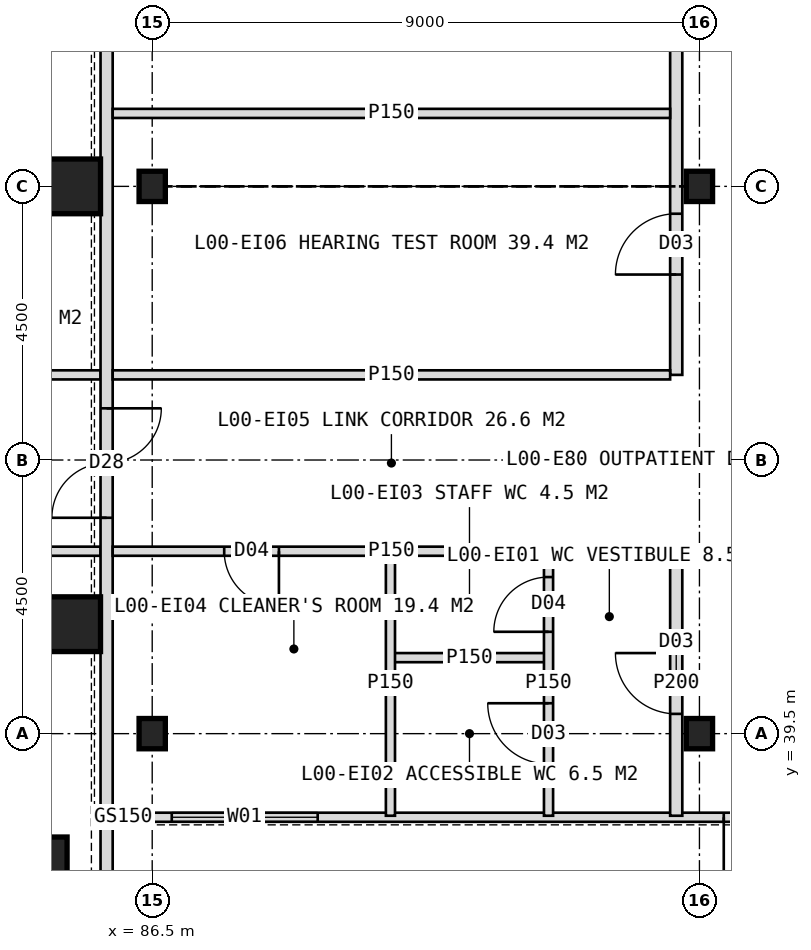
"""IFC4 building model, lengths in metres.
Left out: names, types, materials, properties, quantities, classifications, styles, units other than length and angle.
Written with IfcOpenShell. Run it as: python <this file> out.ifc"""

import sys

from ifc_helpers import new_model, si_unit, direction, frame, frame_2d, origin, origin_2d, place, context, subcontext, project, spatial, rectangle, hollow_rectangle, i_section, extrude, element, fill, save


model = new_model("IFC4")
c1 = context("Model", 3, precision=1e-05, world=origin(), true_north=direction((0.0, 1.0)))
c2 = subcontext(c1, "Body", "Model", "MODEL_VIEW")
j1 = project(units=[si_unit("LENGTHUNIT", "METRE"), si_unit("PLANEANGLEUNIT", "RADIAN")], contexts=[c1])
p1 = place(None, origin())
s1 = spatial("IfcSite", under=j1, at=p1, CompositionType="ELEMENT")
p2 = place(p1, origin())
s2 = spatial("IfcBuilding", under=s1, at=p2, CompositionType="ELEMENT")
p3 = place(p2, origin())
s3 = spatial("IfcBuildingStorey", under=s2, at=p3, CompositionType="ELEMENT", Elevation=0.0)
for number, where, z_axis, x_axis in (
    (1, (85.2, 41.3, 0.0), (0.0, 0.0, 1.0), (1.0, 0.0, 0.0)),
    (2, (85.2, 48.5, 0.0), (0.0, 0.0, 1.0), (1.0, 0.0, 0.0)),
    (3, (84.65, 37.35, 0.0), (0.0, 0.0, 1.0), (1.0, 0.0, 0.0)),
):
    element("IfcColumn", number, at=place(p3, frame(where, z_axis=z_axis, x_axis=x_axis)), inside=s3, PredefinedType="COLUMN", context=c2, shape_type="SweptSolid", body=[
        extrude(hollow_rectangle(XDim=0.9, YDim=0.9, WallThickness=0.08, at=origin_2d()), origin(), (0.0, 0.0, 1.0), 6.0),
    ])
for number, where, z_axis, x_axis in (
    (4, (86.5, 39.5, 0.0), (0.0, 0.0, 1.0), (1.0, 0.0, 0.0)),
    (5, (86.5, 48.5, 0.0), (0.0, 0.0, 1.0), (1.0, 0.0, 0.0)),
    (6, (95.5, 39.5, 0.0), (0.0, 0.0, 1.0), (1.0, 0.0, 0.0)),
    (7, (95.5, 48.5, 0.0), (0.0, 0.0, 1.0), (1.0, 0.0, 0.0)),
):
    element("IfcColumn", number, at=place(p3, frame(where, z_axis=z_axis, x_axis=x_axis)), inside=s3, PredefinedType="COLUMN", context=c2, shape_type="SweptSolid", body=[
        extrude(i_section(OverallWidth=0.432, OverallDepth=0.498, WebThickness=0.056, FlangeThickness=0.089, FilletRadius=0.015, at=origin_2d()), origin(), (0.0, 0.0, 1.0), 6.0),
    ])
p4 = place(p3, frame((85.55, 38.125, 0.0), z_axis=(0.0, 0.0, 1.0), x_axis=(1.0, 0.0, 0.0)))
e8 = element("IfcWall", 8, at=p4, inside=s3, PredefinedType="STANDARD", context=c2, shape_type="SweptSolid", body=[
    extrude(rectangle(XDim=0.95, YDim=0.15, at=frame_2d((0.475, 0.0))), origin(), (0.0, 0.0, 1.0), 6.0),
])
p5 = place(p3, frame((86.5, 38.125, 0.0), z_axis=(0.0, 0.0, 1.0), x_axis=(1.0, 0.0, 0.0)))
e9 = element("IfcWall", 9, at=p5, inside=s3, PredefinedType="STANDARD", context=c2, shape_type="SweptSolid", body=[
    extrude(rectangle(XDim=20.053, YDim=0.15, at=frame_2d((10.027, 0.0))), origin(), (0.0, 0.0, 1.0), 5.1),
])
p6 = place(p5, frame((9.4, 0.0, 0.0)))
e10 = element("IfcOpeningElement", 10, at=p6, cuts=e9, PredefinedType="OPENING", context=c2, shape_type="SweptSolid", body=[
    extrude(rectangle(XDim=1.8, YDim=2.4, at=frame_2d((0.9, 1.2))), frame((0.0, 0.085, 0.0), z_axis=(0.0, -1.0, 0.0), x_axis=(1.0, 0.0, 0.0)), (0.0, 0.0, 1.0), 0.17),
])
p7 = place(p5, frame((0.322, 0.0, 0.6)))
e11 = element("IfcOpeningElement", 11, at=p7, cuts=e9, PredefinedType="OPENING", context=c2, shape_type="SweptSolid", body=[
    extrude(rectangle(XDim=2.4, YDim=3.0, at=frame_2d((1.2, 1.5))), frame((0.0, 0.085, 0.0), z_axis=(0.0, -1.0, 0.0), x_axis=(1.0, 0.0, 0.0)), (0.0, 0.0, 1.0), 0.17),
])
p8 = place(p5, frame((12.919, 0.0, 0.6)))
e12 = element("IfcOpeningElement", 12, at=p8, cuts=e9, PredefinedType="OPENING", context=c2, shape_type="SweptSolid", body=[
    extrude(rectangle(XDim=2.4, YDim=3.0, at=frame_2d((1.2, 1.5))), frame((0.0, 0.085, 0.0), z_axis=(0.0, -1.0, 0.0), x_axis=(1.0, 0.0, 0.0)), (0.0, 0.0, 1.0), 0.17),
])
p9 = place(p5, frame((17.654, 0.0, 0.6)))
e13 = element("IfcOpeningElement", 13, at=p9, cuts=e9, PredefinedType="OPENING", context=c2, shape_type="SweptSolid", body=[
    extrude(rectangle(XDim=2.4, YDim=3.0, at=frame_2d((1.2, 1.5))), frame((0.0, 0.085, 0.0), z_axis=(0.0, -1.0, 0.0), x_axis=(1.0, 0.0, 0.0)), (0.0, 0.0, 1.0), 0.17),
])
for number, where, z_axis, x_axis in (
    (14, (79.5, 45.4, 0.0), (0.0, 0.0, 1.0), (1.0, 0.0, 0.0)),
    (15, (79.5, 42.5, 0.0), (0.0, 0.0, 1.0), (1.0, 0.0, 0.0)),
):
    element("IfcWall", number, at=place(p3, frame(where, z_axis=z_axis, x_axis=x_axis)), inside=s3, PredefinedType="PARTITIONING", context=c2, shape_type="SweptSolid", body=[
        extrude(rectangle(XDim=6.15, YDim=0.15, at=frame_2d((3.075, 0.0))), origin(), (0.0, 0.0, 1.0), 5.7),
    ])
p10 = place(p3, frame((95.118, 38.15, 0.0), z_axis=(0.0, 0.0, 1.0), x_axis=(0.0, 1.0, 0.0)))
e16 = element("IfcWall", 16, at=p10, inside=s3, PredefinedType="PARTITIONING", context=c2, shape_type="SweptSolid", body=[
    extrude(rectangle(XDim=4.35, YDim=0.2, at=frame_2d((2.175, 0.0))), origin(), (0.0, 0.0, 1.0), 5.7),
])
p11 = place(p10, frame((1.675, 0.0, 0.0)))
e17 = element("IfcOpeningElement", 17, at=p11, cuts=e16, PredefinedType="OPENING", context=c2, shape_type="SweptSolid", body=[
    extrude(rectangle(XDim=1.0, YDim=2.1, at=frame_2d((0.5, 1.05))), frame((0.0, 0.11, 0.0), z_axis=(0.0, -1.0, 0.0), x_axis=(1.0, 0.0, 0.0)), (0.0, 0.0, 1.0), 0.22),
])
p12 = place(p3, frame((95.118, 45.4, 0.0), z_axis=(0.0, 0.0, 1.0), x_axis=(0.0, 1.0, 0.0)))
e18 = element("IfcWall", 18, at=p12, inside=s3, PredefinedType="PARTITIONING", context=c2, shape_type="SweptSolid", body=[
    extrude(rectangle(XDim=16.6, YDim=0.2, at=frame_2d((8.3, 0.0))), origin(), (0.0, 0.0, 1.0), 5.7),
])
p13 = place(p12, frame((1.65, 0.0, 0.0)))
e19 = element("IfcOpeningElement", 19, at=p13, cuts=e18, PredefinedType="OPENING", context=c2, shape_type="SweptSolid", body=[
    extrude(rectangle(XDim=1.0, YDim=2.1, at=frame_2d((0.5, 1.05))), frame((0.0, 0.11, 0.0), z_axis=(0.0, -1.0, 0.0), x_axis=(1.0, 0.0, 0.0)), (0.0, 0.0, 1.0), 0.22),
])
p14 = place(p12, frame((5.473, 0.0, 0.0)))
e20 = element("IfcOpeningElement", 20, at=p14, cuts=e18, PredefinedType="OPENING", context=c2, shape_type="SweptSolid", body=[
    extrude(rectangle(XDim=1.0, YDim=2.1, at=frame_2d((0.5, 1.05))), frame((0.0, 0.11, 0.0), z_axis=(0.0, -1.0, 0.0), x_axis=(1.0, 0.0, 0.0)), (0.0, 0.0, 1.0), 0.22),
])
p15 = place(p12, frame((9.624, 0.0, 0.0)))
e21 = element("IfcOpeningElement", 21, at=p15, cuts=e18, PredefinedType="OPENING", context=c2, shape_type="SweptSolid", body=[
    extrude(rectangle(XDim=1.4, YDim=2.2, at=frame_2d((0.7, 1.1))), frame((0.0, 0.11, 0.0), z_axis=(0.0, -1.0, 0.0), x_axis=(1.0, 0.0, 0.0)), (0.0, 0.0, 1.0), 0.22),
])
p16 = place(p12, frame((14.0, 0.0, 0.0)))
e22 = element("IfcOpeningElement", 22, at=p16, cuts=e18, PredefinedType="OPENING", context=c2, shape_type="SweptSolid", body=[
    extrude(rectangle(XDim=1.6, YDim=2.2, at=frame_2d((0.8, 1.1))), frame((0.0, 0.11, 0.0), z_axis=(0.0, -1.0, 0.0), x_axis=(1.0, 0.0, 0.0)), (0.0, 0.0, 1.0), 0.22),
])
p17 = place(p3, frame((85.75, 36.8, 0.0), z_axis=(0.0, 0.0, 1.0), x_axis=(0.0, 1.0, 0.0)))
e23 = element("IfcWall", 23, at=p17, inside=s3, PredefinedType="SOLIDWALL", context=c2, shape_type="SweptSolid", body=[
    extrude(rectangle(XDim=50.4, YDim=0.2, at=frame_2d((25.2, 0.0))), origin(), (0.0, 0.0, 1.0), 5.7),
])
p18 = place(p17, frame((6.25, 0.0, 0.0)))
e24 = element("IfcOpeningElement", 24, at=p18, cuts=e23, PredefinedType="OPENING", context=c2, shape_type="SweptSolid", body=[
    extrude(rectangle(XDim=1.8, YDim=2.2, at=frame_2d((0.9, 1.1))), frame((0.0, 0.11, 0.0), z_axis=(0.0, -1.0, 0.0), x_axis=(1.0, 0.0, 0.0)), (0.0, 0.0, 1.0), 0.22),
])
p19 = place(p17, frame((25.55, 0.0, 0.0)))
e25 = element("IfcOpeningElement", 25, at=p19, cuts=e23, PredefinedType="OPENING", context=c2, shape_type="SweptSolid", body=[
    extrude(rectangle(XDim=1.8, YDim=2.2, at=frame_2d((0.9, 1.1))), frame((0.0, 0.11, 0.0), z_axis=(0.0, -1.0, 0.0), x_axis=(1.0, 0.0, 0.0)), (0.0, 0.0, 1.0), 0.22),
])
p20 = place(p3, frame((93.018, 40.75, 0.0), z_axis=(0.0, 0.0, 1.0), x_axis=(-1.0, 0.0, 0.0)))
e26 = element("IfcWall", 26, at=p20, inside=s3, PredefinedType="PARTITIONING", context=c2, shape_type="SweptSolid", body=[
    extrude(rectangle(XDim=2.6, YDim=0.15, at=frame_2d((1.3, 0.0))), origin(), (0.0, 0.0, 1.0), 5.7),
])
p21 = place(p3, frame((95.018, 42.5, 0.0), z_axis=(0.0, 0.0, 1.0), x_axis=(-1.0, 0.0, 0.0)))
e27 = element("IfcWall", 27, at=p21, inside=s3, PredefinedType="PARTITIONING", context=c2, shape_type="SweptSolid", body=[
    extrude(rectangle(XDim=9.168, YDim=0.15, at=frame_2d((4.584, 0.0))), origin(), (0.0, 0.0, 1.0), 5.7),
])
p22 = place(p21, frame((6.434, 0.0, 0.0)))
e28 = element("IfcOpeningElement", 28, at=p22, cuts=e27, PredefinedType="OPENING", context=c2, shape_type="SweptSolid", body=[
    extrude(rectangle(XDim=0.9, YDim=2.1, at=frame_2d((0.45, 1.05))), frame((0.0, 0.085, 0.0), z_axis=(0.0, -1.0, 0.0), x_axis=(1.0, 0.0, 0.0)), (0.0, 0.0, 1.0), 0.17),
])
for number, where, z_axis, x_axis in (
    (29, (95.018, 45.4, 0.0), (0.0, 0.0, 1.0), (-1.0, 0.0, 0.0)),
    (30, (95.018, 49.7, 0.0), (0.0, 0.0, 1.0), (-1.0, 0.0, 0.0)),
):
    element("IfcWall", number, at=place(p3, frame(where, z_axis=z_axis, x_axis=x_axis)), inside=s3, PredefinedType="PARTITIONING", context=c2, shape_type="SweptSolid", body=[
        extrude(rectangle(XDim=9.168, YDim=0.15, at=frame_2d((4.584, 0.0))), origin(), (0.0, 0.0, 1.0), 5.7),
    ])
p23 = place(p3, frame((93.018, 38.15, 0.0), z_axis=(0.0, 0.0, 1.0), x_axis=(0.0, 1.0, 0.0)))
e31 = element("IfcWall", 31, at=p23, inside=s3, PredefinedType="PARTITIONING", context=c2, shape_type="SweptSolid", body=[
    extrude(rectangle(XDim=4.35, YDim=0.15, at=frame_2d((2.175, 0.0))), origin(), (0.0, 0.0, 1.0), 5.7),
])
p24 = place(p23, frame((0.85, 0.0, 0.0)))
e32 = element("IfcOpeningElement", 32, at=p24, cuts=e31, PredefinedType="OPENING", context=c2, shape_type="SweptSolid", body=[
    extrude(rectangle(XDim=1.0, YDim=2.1, at=frame_2d((0.5, 1.05))), frame((0.0, 0.085, 0.0), z_axis=(0.0, -1.0, 0.0), x_axis=(1.0, 0.0, 0.0)), (0.0, 0.0, 1.0), 0.17),
])
p25 = place(p23, frame((3.025, 0.0, 0.0)))
e33 = element("IfcOpeningElement", 33, at=p25, cuts=e31, PredefinedType="OPENING", context=c2, shape_type="SweptSolid", body=[
    extrude(rectangle(XDim=0.9, YDim=2.1, at=frame_2d((0.45, 1.05))), frame((0.0, 0.085, 0.0), z_axis=(0.0, -1.0, 0.0), x_axis=(1.0, 0.0, 0.0)), (0.0, 0.0, 1.0), 0.17),
])
p26 = place(p3, frame((90.418, 38.15, 0.0), z_axis=(0.0, 0.0, 1.0), x_axis=(0.0, 1.0, 0.0)))
e34 = element("IfcWall", 34, at=p26, inside=s3, PredefinedType="PARTITIONING", context=c2, shape_type="SweptSolid", body=[
    extrude(rectangle(XDim=4.35, YDim=0.15, at=frame_2d((2.175, 0.0))), origin(), (0.0, 0.0, 1.0), 5.7),
])
p27 = place(p6, frame((1.8, 0.0, 0.0), z_axis=(0.0, 0.0, 1.0), x_axis=(-1.0, 0.0, 0.0)))
e35 = element("IfcDoor", 35, at=p27, inside=s3, OperationType="DOUBLE_DOOR_SINGLE_SWING", PredefinedType="DOOR", context=c2, shape_type="SweptSolid", body=[
    extrude(rectangle(XDim=1.8, YDim=2.4, at=frame_2d((0.9, 1.2))), frame((0.0, 0.025, 0.0), z_axis=(0.0, -1.0, 0.0), x_axis=(1.0, 0.0, 0.0)), (0.0, 0.0, 1.0), 0.05),
])
fill(e10, e35)
p28 = place(p7, origin())
e36 = element("IfcWindow", 36, at=p28, inside=s3, PartitioningType="SINGLE_PANEL", PredefinedType="WINDOW", context=c2, shape_type="SweptSolid", body=[
    extrude(rectangle(XDim=2.4, YDim=3.0, at=frame_2d((1.2, 1.5))), frame((0.0, 0.03, 0.0), z_axis=(0.0, -1.0, 0.0), x_axis=(1.0, 0.0, 0.0)), (0.0, 0.0, 1.0), 0.06),
])
fill(e11, e36)
p29 = place(p18, origin())
e37 = element("IfcDoor", 37, at=p29, inside=s3, OperationType="DOUBLE_DOOR_SINGLE_SWING", PredefinedType="DOOR", context=c2, shape_type="SweptSolid", body=[
    extrude(rectangle(XDim=1.8, YDim=2.2, at=frame_2d((0.9, 1.1))), frame((0.0, 0.025, 0.0), z_axis=(0.0, -1.0, 0.0), x_axis=(1.0, 0.0, 0.0)), (0.0, 0.0, 1.0), 0.05),
])
fill(e24, e37)
p30 = place(p11, origin())
e38 = element("IfcDoor", 38, at=p30, inside=s3, OperationType="SINGLE_SWING_RIGHT", PredefinedType="DOOR", context=c2, shape_type="SweptSolid", body=[
    extrude(rectangle(XDim=1.0, YDim=2.1, at=frame_2d((0.5, 1.05))), frame((0.0, 0.025, 0.0), z_axis=(0.0, -1.0, 0.0), x_axis=(1.0, 0.0, 0.0)), (0.0, 0.0, 1.0), 0.05),
])
fill(e17, e38)
p31 = place(p24, origin())
e39 = element("IfcDoor", 39, at=p31, inside=s3, OperationType="SINGLE_SWING_RIGHT", PredefinedType="DOOR", context=c2, shape_type="SweptSolid", body=[
    extrude(rectangle(XDim=1.0, YDim=2.1, at=frame_2d((0.5, 1.05))), frame((0.0, 0.025, 0.0), z_axis=(0.0, -1.0, 0.0), x_axis=(1.0, 0.0, 0.0)), (0.0, 0.0, 1.0), 0.05),
])
fill(e32, e39)
p32 = place(p25, origin())
e40 = element("IfcDoor", 40, at=p32, inside=s3, OperationType="SINGLE_SWING_LEFT", PredefinedType="DOOR", context=c2, shape_type="SweptSolid", body=[
    extrude(rectangle(XDim=0.9, YDim=2.1, at=frame_2d((0.45, 1.05))), frame((0.0, 0.025, 0.0), z_axis=(0.0, -1.0, 0.0), x_axis=(1.0, 0.0, 0.0)), (0.0, 0.0, 1.0), 0.05),
])
fill(e33, e40)
p33 = place(p22, origin())
e41 = element("IfcDoor", 41, at=p33, inside=s3, OperationType="SINGLE_SWING_LEFT", PredefinedType="DOOR", context=c2, shape_type="SweptSolid", body=[
    extrude(rectangle(XDim=0.9, YDim=2.1, at=frame_2d((0.45, 1.05))), frame((0.0, 0.025, 0.0), z_axis=(0.0, -1.0, 0.0), x_axis=(1.0, 0.0, 0.0)), (0.0, 0.0, 1.0), 0.05),
])
fill(e28, e41)
p34 = place(p13, origin())
e42 = element("IfcDoor", 42, at=p34, inside=s3, OperationType="SINGLE_SWING_LEFT", PredefinedType="DOOR", context=c2, shape_type="SweptSolid", body=[
    extrude(rectangle(XDim=1.0, YDim=2.1, at=frame_2d((0.5, 1.05))), frame((0.0, 0.025, 0.0), z_axis=(0.0, -1.0, 0.0), x_axis=(1.0, 0.0, 0.0)), (0.0, 0.0, 1.0), 0.05),
])
fill(e19, e42)
save(model, sys.argv[1])
